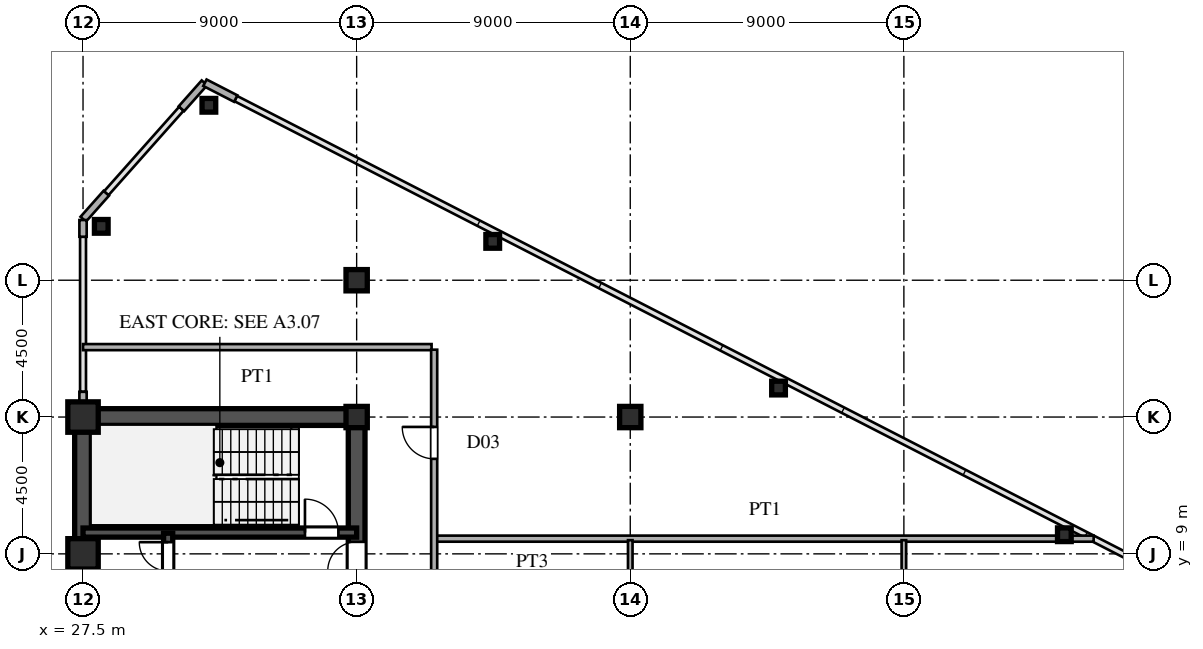
"""IFC4 building model, lengths in metres.
Left out: names, types, materials, properties, quantities, classifications, styles, units other than length and angle.
Written with IfcOpenShell. Run it as: python <this file> out.ifc"""

import sys

from ifc_helpers import new_model, si_unit, direction, frame, frame_2d, origin, origin_2d, place, context, subcontext, project, spatial, rectangle, hollow_rectangle, i_section, extrude, source, transform, mapped, element, fill, save


model = new_model("IFC4")
c1 = context("Model", 3, precision=1e-05, world=origin(), true_north=direction((0.0, 1.0)))
c2 = subcontext(c1, "Body", "Model", "MODEL_VIEW")
j1 = project(units=[si_unit("LENGTHUNIT", "METRE"), si_unit("PLANEANGLEUNIT", "RADIAN")], contexts=[c1])
p1 = place(None, origin())
s1 = spatial("IfcSite", under=j1, at=p1, CompositionType="ELEMENT")
p2 = place(p1, origin())
s2 = spatial("IfcBuilding", under=s1, at=p2, CompositionType="ELEMENT")
p3 = place(p2, frame((0.0, 0.0, 140.4)))
s3 = spatial("IfcBuildingStorey", under=s2, at=p3, CompositionType="ELEMENT", Elevation=140.4)
m1 = source(origin(), c2, "Body", "SweptSolid", [
    extrude(hollow_rectangle(XDim=1.0, YDim=1.0, WallThickness=0.042, at=origin_2d()), origin(), (0.0, 0.0, 1.0), 3.6),
])
for number, where, z_axis, x_axis in (
    (1, (27.5, 9.0, 0.0), (0.0, 0.0, 1.0), (1.0, 0.0, 0.0)),
    (2, (27.5, 13.5, 0.0), (0.0, 0.0, 1.0), (1.0, 0.0, 0.0)),
):
    element("IfcColumn", number, at=place(p3, frame(where, z_axis=z_axis, x_axis=x_axis)), inside=s3, PredefinedType="COLUMN", context=c2, shape_type="MappedRepresentation", body=[
        mapped(m1, transform((0.0, 0.0, 0.0), scale=1.0)),
    ])
m2 = source(origin(), c2, "Body", "SweptSolid", [
    extrude(i_section(OverallWidth=0.7, OverallDepth=0.7, WebThickness=0.028, FlangeThickness=0.045, at=origin_2d()), origin(), (0.0, 0.0, 1.0), 3.6),
])
for number, where, z_axis, x_axis in (
    (3, (36.5, 13.5, 0.0), (0.0, 0.0, 1.0), (1.0, 0.0, 0.0)),
    (4, (36.5, 18.0, 0.0), (0.0, 0.0, 1.0), (1.0, 0.0, 0.0)),
    (5, (45.5, 13.5, 0.0), (0.0, 0.0, 1.0), (1.0, 0.0, 0.0)),
):
    element("IfcColumn", number, at=place(p3, frame(where, z_axis=z_axis, x_axis=x_axis)), inside=s3, PredefinedType="COLUMN", context=c2, shape_type="MappedRepresentation", body=[
        mapped(m2, transform((0.0, 0.0, 0.0), scale=1.0)),
    ])
m3 = source(origin(), c2, "Body", "SweptSolid", [
    extrude(hollow_rectangle(XDim=0.45, YDim=0.45, WallThickness=0.018, at=origin_2d()), origin(), (0.0, 0.0, 1.0), 3.6),
])
for number, where, z_axis, x_axis in (
    (6, (31.64, 23.754, 0.0), (0.0, 0.0, 1.0), (1.0, 0.0, 0.0)),
    (7, (28.1, 19.772, 0.0), (0.0, 0.0, 1.0), (1.0, 0.0, 0.0)),
    (8, (40.976, 19.278, 0.0), (0.0, 0.0, 1.0), (1.0, 0.0, 0.0)),
    (9, (50.377, 14.453, 0.0), (0.0, 0.0, 1.0), (1.0, 0.0, 0.0)),
    (10, (59.779, 9.629, 0.0), (0.0, 0.0, 1.0), (1.0, 0.0, 0.0)),
):
    element("IfcColumn", number, at=place(p3, frame(where, z_axis=z_axis, x_axis=x_axis)), inside=s3, PredefinedType="COLUMN", context=c2, shape_type="MappedRepresentation", body=[
        mapped(m3, transform((0.0, 0.0, 0.0), scale=1.0)),
    ])
p4 = place(p3, frame((32.523, 23.975, 0.0), z_axis=(0.0, 0.0, 1.0), x_axis=(-0.889797395748, 0.456355776255, 0.0)))
e11 = element("IfcWall", 11, at=p4, inside=s3, PredefinedType="SOLIDWALL", context=c2, shape_type="SweptSolid", body=[
    extrude(rectangle(XDim=1.14, YDim=0.24, at=frame_2d((0.57, 0.0))), origin(), (0.0, 0.0, 1.0), 3.38),
])
for number, where, z_axis, x_axis in (
    (12, (31.493, 24.492, 0.0), (0.0, 0.0, 1.0), (-0.664, -0.747, 0.0)),
    (13, (28.264, 20.86, 0.0), (0.0, 0.0, 1.0), (-0.664, -0.747, 0.0)),
):
    element("IfcWall", number, at=place(p3, frame(where, z_axis=z_axis, x_axis=x_axis)), inside=s3, PredefinedType="SOLIDWALL", context=c2, shape_type="SweptSolid", body=[
        extrude(rectangle(XDim=1.14, YDim=0.24, at=frame_2d((0.57, 0.0))), origin(), (0.0, 0.0, 1.0), 3.38),
    ])
p5 = place(p3, frame((27.5, 13.78, 0.0), z_axis=(0.0, 0.0, 1.0), x_axis=(0.0, 1.0, 0.0)))
e14 = element("IfcWall", 14, at=p5, inside=s3, PredefinedType="SOLIDWALL", context=c2, shape_type="SweptSolid", body=[
    extrude(rectangle(XDim=0.55, YDim=0.24, at=frame_2d((0.275, 0.0))), origin(), (0.0, 0.0, 1.0), 2.88),
])
p6 = place(p3, frame((27.5, 19.43, 0.0), z_axis=(0.0, 0.0, 1.0), x_axis=(0.0, 1.0, 0.0)))
e15 = element("IfcWall", 15, at=p6, inside=s3, PredefinedType="SOLIDWALL", context=c2, shape_type="SweptSolid", body=[
    extrude(rectangle(XDim=0.55, YDim=0.24, at=frame_2d((0.275, 0.0))), origin(), (0.0, 0.0, 1.0), 3.38),
])
p7 = place(p3, frame((27.5, 1.3, 0.0), z_axis=(0.0, 0.0, 1.0), x_axis=(0.0, 1.0, 0.0)))
e16 = element("IfcWall", 16, at=p7, inside=s3, PredefinedType="SHEAR", context=c2, shape_type="SweptSolid", body=[
    extrude(rectangle(XDim=12.2, YDim=0.55, at=frame_2d((6.1, 0.0))), origin(), (0.0, 0.0, 1.0), 3.38),
])
p8 = place(p3, frame((27.5, 13.5, 0.0), z_axis=(0.0, 0.0, 1.0), x_axis=(1.0, 0.0, 0.0)))
e17 = element("IfcWall", 17, at=p8, inside=s3, PredefinedType="SHEAR", context=c2, shape_type="SweptSolid", body=[
    extrude(rectangle(XDim=9.0, YDim=0.55, at=frame_2d((4.5, 0.0))), origin(), (0.0, 0.0, 1.0), 3.38),
])
p9 = place(p3, frame((36.5, 8.2, 0.0), z_axis=(0.0, 0.0, 1.0), x_axis=(0.0, 1.0, 0.0)))
e18 = element("IfcWall", 18, at=p9, inside=s3, PredefinedType="SHEAR", context=c2, shape_type="SweptSolid", body=[
    extrude(rectangle(XDim=5.45, YDim=0.55, at=frame_2d((2.725, 0.0))), origin(), (0.0, 0.0, 1.0), 3.38),
])
p10 = place(p9, frame((0.245, 0.0, 0.0)))
e19 = element("IfcOpeningElement", 19, at=p10, cuts=e18, PredefinedType="OPENING", context=c2, shape_type="SweptSolid", body=[
    extrude(rectangle(XDim=0.95, YDim=2.15, at=frame_2d((0.475, 1.075))), frame((0.0, 0.285, 0.0), z_axis=(0.0, -1.0, 0.0), x_axis=(1.0, 0.0, 0.0)), (0.0, 0.0, 1.0), 0.57),
])
p11 = place(p3, frame((27.5, 9.7, 0.0), z_axis=(0.0, 0.0, 1.0), x_axis=(1.0, 0.0, 0.0)))
e20 = element("IfcWall", 20, at=p11, inside=s3, PredefinedType="SHEAR", context=c2, shape_type="SweptSolid", body=[
    extrude(rectangle(XDim=9.0, YDim=0.3, at=frame_2d((4.5, 0.0))), origin(), (0.0, 0.0, 1.0), 3.38),
])
p12 = place(p11, frame((7.3, 0.0, 0.0)))
e21 = element("IfcOpeningElement", 21, at=p12, cuts=e20, PredefinedType="OPENING", context=c2, shape_type="SweptSolid", body=[
    extrude(rectangle(XDim=1.1, YDim=2.2, at=frame_2d((0.55, 1.1))), frame((0.0, 0.16, 0.0), z_axis=(0.0, -1.0, 0.0), x_axis=(1.0, 0.0, 0.0)), (0.0, 0.0, 1.0), 0.32),
])
p13 = place(p3, frame((30.3, 8.15, 0.0), z_axis=(0.0, 0.0, 1.0), x_axis=(0.0, 1.0, 0.0)))
e22 = element("IfcWall", 22, at=p13, inside=s3, PredefinedType="SHEAR", context=c2, shape_type="SweptSolid", body=[
    extrude(rectangle(XDim=1.53, YDim=0.3, at=frame_2d((0.765, 0.0))), origin(), (0.0, 0.0, 1.0), 3.38),
])
p14 = place(p13, frame((0.285, 0.0, 0.0)))
e23 = element("IfcOpeningElement", 23, at=p14, cuts=e22, PredefinedType="OPENING", context=c2, shape_type="SweptSolid", body=[
    extrude(rectangle(XDim=0.95, YDim=2.15, at=frame_2d((0.475, 1.075))), frame((0.0, 0.16, 0.0), z_axis=(0.0, -1.0, 0.0), x_axis=(1.0, 0.0, 0.0)), (0.0, 0.0, 1.0), 0.32),
])
p15 = place(p3, frame((39.13, 9.5, 0.0), z_axis=(0.0, 0.0, 1.0), x_axis=(1.0, 0.0, 0.0)))
e24 = element("IfcWall", 24, at=p15, inside=s3, PredefinedType="PARTITIONING", context=c2, shape_type="SweptSolid", body=[
    extrude(rectangle(XDim=21.612, YDim=0.2, at=frame_2d((10.806, 0.0))), origin(), (0.0, 0.0, 1.0), 3.38),
])
p16 = place(p3, frame((27.5, 15.8, 0.0), z_axis=(0.0, 0.0, 1.0), x_axis=(1.0, 0.0, 0.0)))
e25 = element("IfcWall", 25, at=p16, inside=s3, PredefinedType="PARTITIONING", context=c2, shape_type="SweptSolid", body=[
    extrude(rectangle(XDim=11.465, YDim=0.2, at=frame_2d((5.732, 0.0))), origin(), (0.0, 0.0, 1.0), 3.38),
])
p17 = place(p3, frame((39.05, -15.715, 0.0), z_axis=(0.0, 0.0, 1.0), x_axis=(0.0, 1.0, 0.0)))
e26 = element("IfcWall", 26, at=p17, inside=s3, PredefinedType="PARTITIONING", context=c2, shape_type="SweptSolid", body=[
    extrude(rectangle(XDim=31.43, YDim=0.2, at=frame_2d((15.715, 0.0))), origin(), (0.0, 0.0, 1.0), 3.38),
])
p18 = place(p17, frame((1.54, 0.0, 0.0)))
e27 = element("IfcOpeningElement", 27, at=p18, cuts=e26, PredefinedType="OPENING", context=c2, shape_type="SweptSolid", body=[
    extrude(rectangle(XDim=1.05, YDim=2.25, at=frame_2d((0.525, 1.125))), frame((0.0, 0.11, 0.0), z_axis=(0.0, -1.0, 0.0), x_axis=(1.0, 0.0, 0.0)), (0.0, 0.0, 1.0), 0.22),
])
p19 = place(p17, frame((8.782, 0.0, 0.0)))
e28 = element("IfcOpeningElement", 28, at=p19, cuts=e26, PredefinedType="OPENING", context=c2, shape_type="SweptSolid", body=[
    extrude(rectangle(XDim=1.05, YDim=2.25, at=frame_2d((0.525, 1.125))), frame((0.0, 0.11, 0.0), z_axis=(0.0, -1.0, 0.0), x_axis=(1.0, 0.0, 0.0)), (0.0, 0.0, 1.0), 0.22),
])
p20 = place(p17, frame((19.282, 0.0, 0.0)))
e29 = element("IfcOpeningElement", 29, at=p20, cuts=e26, PredefinedType="OPENING", context=c2, shape_type="SweptSolid", body=[
    extrude(rectangle(XDim=1.05, YDim=2.25, at=frame_2d((0.525, 1.125))), frame((0.0, 0.11, 0.0), z_axis=(0.0, -1.0, 0.0), x_axis=(1.0, 0.0, 0.0)), (0.0, 0.0, 1.0), 0.22),
])
p21 = place(p17, frame((27.84, 0.0, 0.0)))
e30 = element("IfcOpeningElement", 30, at=p21, cuts=e26, PredefinedType="OPENING", context=c2, shape_type="SweptSolid", body=[
    extrude(rectangle(XDim=1.05, YDim=2.25, at=frame_2d((0.525, 1.125))), frame((0.0, 0.11, 0.0), z_axis=(0.0, -1.0, 0.0), x_axis=(1.0, 0.0, 0.0)), (0.0, 0.0, 1.0), 0.22),
])
p22 = place(p3, frame((45.5, 6.402, 0.0), z_axis=(0.0, 0.0, 1.0), x_axis=(0.0, 1.0, 0.0)))
e31 = element("IfcWall", 31, at=p22, inside=s3, PredefinedType="PARTITIONING", context=c2, shape_type="SweptSolid", body=[
    extrude(rectangle(XDim=3.048, YDim=0.15, at=frame_2d((1.524, 0.0))), origin(), (0.0, 0.0, 1.0), 2.78),
])
p23 = place(p3, frame((54.5, -11.45, 0.0), z_axis=(0.0, 0.0, 1.0), x_axis=(0.0, 1.0, 0.0)))
e32 = element("IfcWall", 32, at=p23, inside=s3, PredefinedType="PARTITIONING", context=c2, shape_type="SweptSolid", body=[
    extrude(rectangle(XDim=20.9, YDim=0.15, at=frame_2d((10.45, 0.0))), origin(), (0.0, 0.0, 1.0), 2.78),
])
p24 = place(p23, frame((4.725, 0.0, 0.0)))
e33 = element("IfcOpeningElement", 33, at=p24, cuts=e32, PredefinedType="OPENING", context=c2, shape_type="SweptSolid", body=[
    extrude(rectangle(XDim=0.95, YDim=2.15, at=frame_2d((0.475, 1.075))), frame((0.0, 0.085, 0.0), z_axis=(0.0, -1.0, 0.0), x_axis=(1.0, 0.0, 0.0)), (0.0, 0.0, 1.0), 0.17),
])
p25 = place(p23, frame((1.225, 0.0, 0.0)))
e34 = element("IfcOpeningElement", 34, at=p25, cuts=e32, PredefinedType="OPENING", context=c2, shape_type="SweptSolid", body=[
    extrude(rectangle(XDim=0.95, YDim=2.15, at=frame_2d((0.475, 1.075))), frame((0.0, 0.085, 0.0), z_axis=(0.0, -1.0, 0.0), x_axis=(1.0, 0.0, 0.0)), (0.0, 0.0, 1.0), 0.17),
])
p26 = place(p23, frame((8.225, 0.0, 0.0)))
e35 = element("IfcOpeningElement", 35, at=p26, cuts=e32, PredefinedType="OPENING", context=c2, shape_type="SweptSolid", body=[
    extrude(rectangle(XDim=0.95, YDim=2.15, at=frame_2d((0.475, 1.075))), frame((0.0, 0.085, 0.0), z_axis=(0.0, -1.0, 0.0), x_axis=(1.0, 0.0, 0.0)), (0.0, 0.0, 1.0), 0.17),
])
p27 = place(p23, frame((14.552, 0.0, 0.0)))
e36 = element("IfcOpeningElement", 36, at=p27, cuts=e32, PredefinedType="OPENING", context=c2, shape_type="SweptSolid", body=[
    extrude(rectangle(XDim=0.95, YDim=2.15, at=frame_2d((0.475, 1.075))), frame((0.0, 0.085, 0.0), z_axis=(0.0, -1.0, 0.0), x_axis=(1.0, 0.0, 0.0)), (0.0, 0.0, 1.0), 0.17),
])
m4 = source(origin(), c2, "Body", "SweptSolid", [
    extrude(rectangle(XDim=0.95, YDim=2.15, at=frame_2d((0.475, 1.075))), frame((0.0, 0.025, 0.0), z_axis=(0.0, -1.0, 0.0), x_axis=(1.0, 0.0, 0.0)), (0.0, 0.0, 1.0), 0.05),
])
p28 = place(p10, origin())
e37 = element("IfcDoor", 37, at=p28, inside=s3, OperationType="SINGLE_SWING_LEFT", PredefinedType="DOOR", context=c2, shape_type="MappedRepresentation", body=[
    mapped(m4, transform((0.0, 0.0, 0.0), scale=1.0)),
])
fill(e19, e37)
m5 = source(origin(), c2, "Body", "SweptSolid", [
    extrude(rectangle(XDim=1.1, YDim=2.2, at=frame_2d((0.55, 1.1))), frame((0.0, 0.025, 0.0), z_axis=(0.0, -1.0, 0.0), x_axis=(1.0, 0.0, 0.0)), (0.0, 0.0, 1.0), 0.05),
])
p29 = place(p12, origin())
e38 = element("IfcDoor", 38, at=p29, inside=s3, OperationType="SINGLE_SWING_LEFT", PredefinedType="DOOR", context=c2, shape_type="MappedRepresentation", body=[
    mapped(m5, transform((0.0, 0.0, 0.0), scale=1.0)),
])
fill(e21, e38)
p30 = place(p14, origin())
e39 = element("IfcDoor", 39, at=p30, inside=s3, OperationType="SINGLE_SWING_RIGHT", PredefinedType="DOOR", context=c2, shape_type="MappedRepresentation", body=[
    mapped(m4, transform((0.0, 0.0, 0.0), scale=1.0)),
])
fill(e23, e39)
m6 = source(origin(), c2, "Body", "SweptSolid", [
    extrude(rectangle(XDim=1.05, YDim=2.25, at=frame_2d((0.525, 1.125))), frame((0.0, 0.025, 0.0), z_axis=(0.0, -1.0, 0.0), x_axis=(1.0, 0.0, 0.0)), (0.0, 0.0, 1.0), 0.05),
])
p31 = place(p21, origin())
e40 = element("IfcDoor", 40, at=p31, inside=s3, OperationType="SINGLE_SWING_RIGHT", PredefinedType="DOOR", context=c2, shape_type="MappedRepresentation", body=[
    mapped(m6, transform((0.0, 0.0, 0.0), scale=1.0)),
])
fill(e30, e40)
save(model, sys.argv[1])
